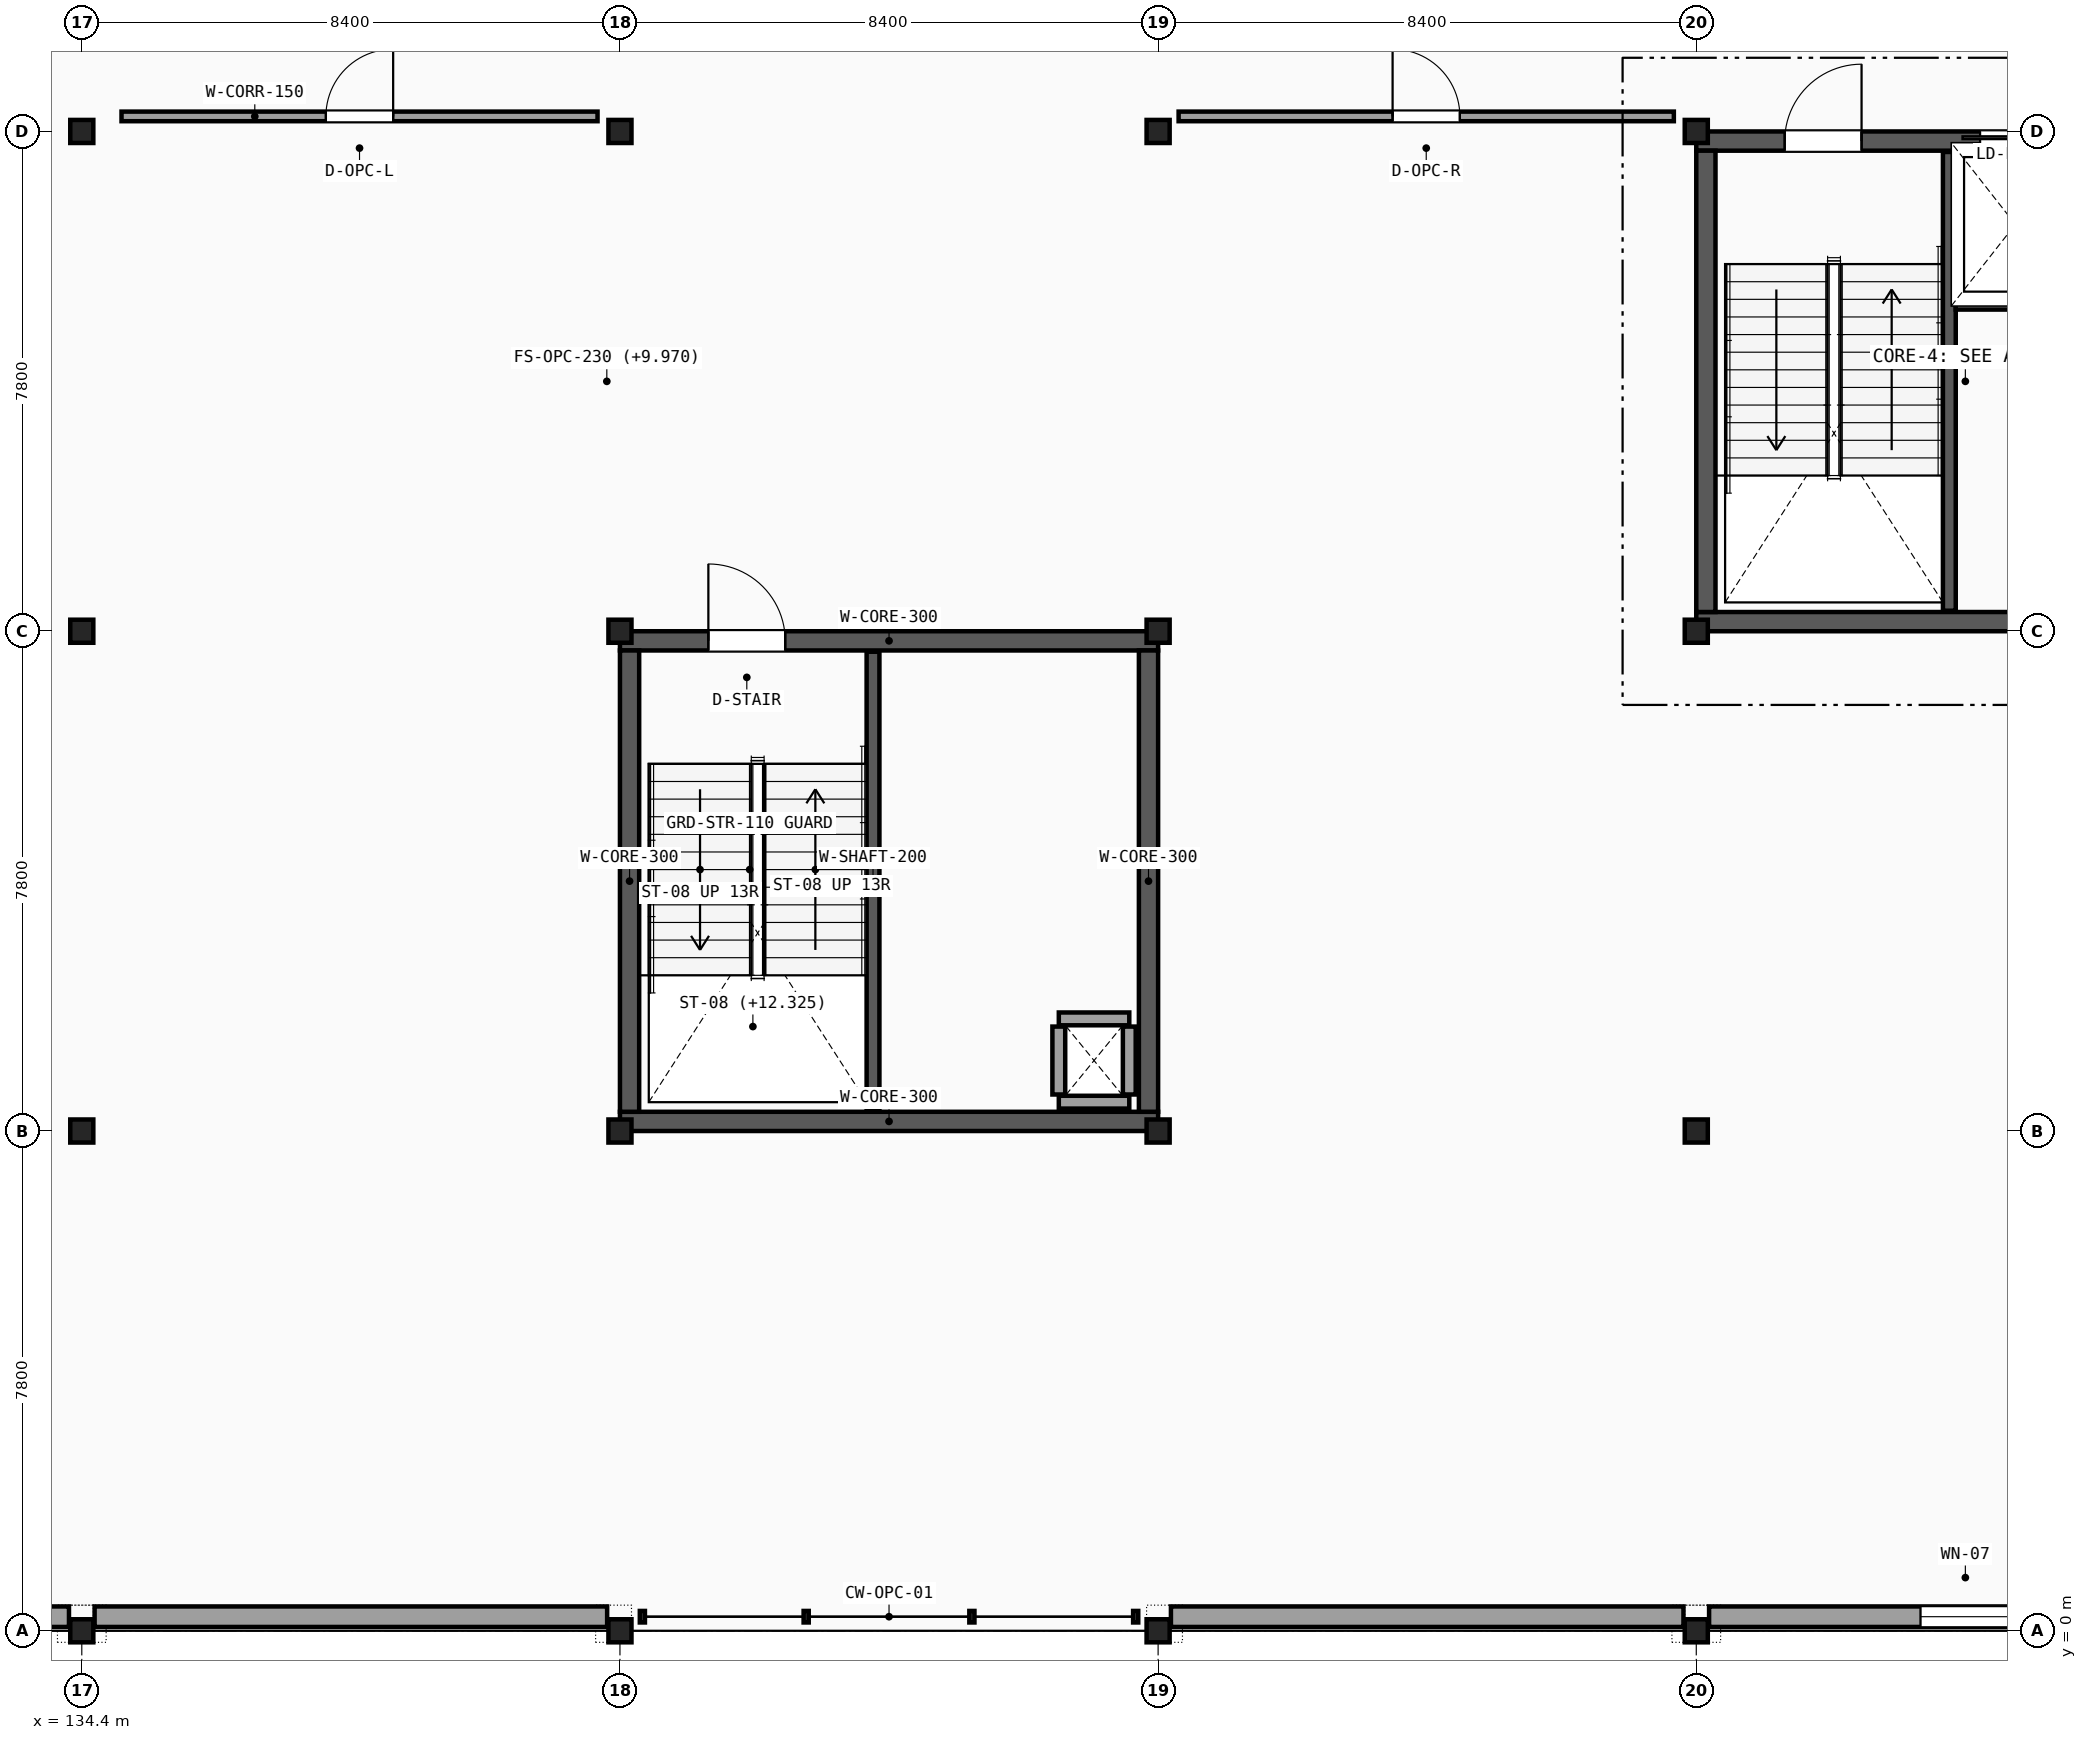
"""IFC4 building model, lengths in metres.
Left out: names, types, materials, properties, quantities, classifications, styles, units other than length and angle.
Written with IfcOpenShell. Run it as: python <this file> out.ifc"""

import sys

from ifc_helpers import new_model, si_unit, direction, frame, frame_2d, origin, origin_2d, place, context, subcontext, project, spatial, rectangle, i_section, extrude, element, fill, save


model = new_model("IFC4")
c1 = context("Model", 3, precision=1e-05, world=origin(), true_north=direction((0.0, 1.0)))
c2 = subcontext(c1, "Body", "Model", "MODEL_VIEW")
j1 = project(units=[si_unit("LENGTHUNIT", "METRE"), si_unit("PLANEANGLEUNIT", "RADIAN")], contexts=[c1])
p1 = place(None, origin())
s1 = spatial("IfcSite", under=j1, at=p1, CompositionType="ELEMENT")
p2 = place(p1, origin())
s2 = spatial("IfcBuilding", under=s1, at=p2, CompositionType="ELEMENT")
p3 = place(p2, frame((0.0, 0.0, 10.2)))
s3 = spatial("IfcBuildingStorey", under=s2, at=p3, CompositionType="ELEMENT", Elevation=10.2)
for number, where, z_axis, x_axis in (
    (1, (134.4, 0.0, 0.0), (0.0, 0.0, 1.0), (1.0, 0.0, 0.0)),
    (2, (134.4, 7.8, 0.0), (0.0, 0.0, 1.0), (1.0, 0.0, 0.0)),
    (3, (134.4, 15.6, 0.0), (0.0, 0.0, 1.0), (1.0, 0.0, 0.0)),
    (4, (134.4, 23.4, 0.0), (0.0, 0.0, 1.0), (1.0, 0.0, 0.0)),
    (5, (142.8, 0.0, 0.0), (0.0, 0.0, 1.0), (1.0, 0.0, 0.0)),
    (6, (142.8, 7.8, 0.0), (0.0, 0.0, 1.0), (1.0, 0.0, 0.0)),
    (7, (142.8, 15.6, 0.0), (0.0, 0.0, 1.0), (1.0, 0.0, 0.0)),
    (8, (142.8, 23.4, 0.0), (0.0, 0.0, 1.0), (1.0, 0.0, 0.0)),
    (9, (151.2, 0.0, 0.0), (0.0, 0.0, 1.0), (1.0, 0.0, 0.0)),
    (10, (151.2, 7.8, 0.0), (0.0, 0.0, 1.0), (1.0, 0.0, 0.0)),
    (11, (151.2, 15.6, 0.0), (0.0, 0.0, 1.0), (1.0, 0.0, 0.0)),
    (12, (151.2, 23.4, 0.0), (0.0, 0.0, 1.0), (1.0, 0.0, 0.0)),
    (13, (159.6, 0.0, 0.0), (0.0, 0.0, 1.0), (1.0, 0.0, 0.0)),
    (14, (159.6, 7.8, 0.0), (0.0, 0.0, 1.0), (1.0, 0.0, 0.0)),
    (15, (159.6, 15.6, 0.0), (0.0, 0.0, 1.0), (1.0, 0.0, 0.0)),
    (16, (159.6, 23.4, 0.0), (0.0, 0.0, 1.0), (1.0, 0.0, 0.0)),
):
    element("IfcColumn", number, at=place(p3, frame(where, z_axis=z_axis, x_axis=x_axis)), inside=s3, PredefinedType="COLUMN", context=c2, shape_type="SweptSolid", body=[
        extrude(i_section(OverallWidth=0.3, OverallDepth=0.36, WebThickness=0.012, FlangeThickness=0.022, FilletRadius=0.027, at=origin_2d()), origin(), (0.0, 0.0, 1.0), 4.65),
    ])
p4 = place(p3, frame((126.2, 0.22, 0.0), z_axis=(0.0, 0.0, 1.0), x_axis=(1.0, 0.0, 0.0)))
e17 = element("IfcWall", 17, at=p4, inside=s3, PredefinedType="SOLIDWALL", context=c2, shape_type="SweptSolid", body=[
    extrude(rectangle(XDim=8.0, YDim=0.32, at=frame_2d((4.0, 0.0))), origin(), (0.0, 0.0, 1.0), 4.0),
])
p5 = place(p4, frame((3.1, 0.0, 1.4)))
e18 = element("IfcOpeningElement", 18, at=p5, cuts=e17, PredefinedType="OPENING", context=c2, shape_type="SweptSolid", body=[
    extrude(rectangle(XDim=1.8, YDim=1.1, at=frame_2d((0.9, 0.55))), frame((0.0, 0.17, 0.0), z_axis=(0.0, -1.0, 0.0), x_axis=(1.0, 0.0, 0.0)), (0.0, 0.0, 1.0), 0.34),
])
for number, where, z_axis, x_axis in (
    (19, (134.6, 0.22, 0.0), (0.0, 0.0, 1.0), (1.0, 0.0, 0.0)),
    (20, (151.4, 0.22, 0.0), (0.0, 0.0, 1.0), (1.0, 0.0, 0.0)),
):
    element("IfcWall", number, at=place(p3, frame(where, z_axis=z_axis, x_axis=x_axis)), inside=s3, PredefinedType="SOLIDWALL", context=c2, shape_type="SweptSolid", body=[
        extrude(rectangle(XDim=8.0, YDim=0.32, at=frame_2d((4.0, 0.0))), origin(), (0.0, 0.0, 1.0), 4.0),
    ])
p6 = place(p3, frame((159.8, 0.22, 0.0), z_axis=(0.0, 0.0, 1.0), x_axis=(1.0, 0.0, 0.0)))
e21 = element("IfcWall", 21, at=p6, inside=s3, PredefinedType="SOLIDWALL", context=c2, shape_type="SweptSolid", body=[
    extrude(rectangle(XDim=8.0, YDim=0.32, at=frame_2d((4.0, 0.0))), origin(), (0.0, 0.0, 1.0), 4.0),
])
p7 = place(p6, frame((3.3, 0.0, 0.95)))
e22 = element("IfcOpeningElement", 22, at=p7, cuts=e21, PredefinedType="OPENING", context=c2, shape_type="SweptSolid", body=[
    extrude(rectangle(XDim=1.4, YDim=1.55, at=frame_2d((0.7, 0.775))), frame((0.0, 0.17, 0.0), z_axis=(0.0, -1.0, 0.0), x_axis=(1.0, 0.0, 0.0)), (0.0, 0.0, 1.0), 0.34),
])
p8 = place(p3, frame((159.6, 15.75, 0.0), z_axis=(0.0, 0.0, 1.0), x_axis=(1.0, 0.0, 0.0)))
e23 = element("IfcWall", 23, at=p8, inside=s3, PredefinedType="SHEAR", context=c2, shape_type="SweptSolid", body=[
    extrude(rectangle(XDim=8.4, YDim=0.3, at=frame_2d((4.2, 0.0))), origin(), (0.0, 0.0, 1.0), 4.42),
])
p9 = place(p3, frame((159.6, 23.25, 0.0), z_axis=(0.0, 0.0, 1.0), x_axis=(1.0, 0.0, 0.0)))
e24 = element("IfcWall", 24, at=p9, inside=s3, PredefinedType="SHEAR", context=c2, shape_type="SweptSolid", body=[
    extrude(rectangle(XDim=8.4, YDim=0.3, at=frame_2d((4.2, 0.0))), origin(), (0.0, 0.0, 1.0), 4.42),
])
p10 = place(p9, frame((1.38, 0.0, 0.0)))
e25 = element("IfcOpeningElement", 25, at=p10, cuts=e24, PredefinedType="OPENING", context=c2, shape_type="SweptSolid", body=[
    extrude(rectangle(XDim=1.2, YDim=2.15, at=frame_2d((0.6, 1.075))), frame((0.0, 0.16, 0.0), z_axis=(0.0, -1.0, 0.0), x_axis=(1.0, 0.0, 0.0)), (0.0, 0.0, 1.0), 0.32),
])
p11 = place(p9, frame((4.43, 0.0, 0.0)))
e26 = element("IfcOpeningElement", 26, at=p11, cuts=e24, PredefinedType="OPENING", context=c2, shape_type="SweptSolid", body=[
    extrude(rectangle(XDim=1.1, YDim=2.15, at=frame_2d((0.55, 1.075))), frame((0.0, 0.16, 0.0), z_axis=(0.0, -1.0, 0.0), x_axis=(1.0, 0.0, 0.0)), (0.0, 0.0, 1.0), 0.32),
])
p12 = place(p9, frame((6.45, 0.0, 0.0)))
e27 = element("IfcOpeningElement", 27, at=p12, cuts=e24, PredefinedType="OPENING", context=c2, shape_type="SweptSolid", body=[
    extrude(rectangle(XDim=1.1, YDim=2.15, at=frame_2d((0.55, 1.075))), frame((0.0, 0.16, 0.0), z_axis=(0.0, -1.0, 0.0), x_axis=(1.0, 0.0, 0.0)), (0.0, 0.0, 1.0), 0.32),
])
p13 = place(p3, frame((159.75, 15.9, 0.0), z_axis=(0.0, 0.0, 1.0), x_axis=(0.0, 1.0, 0.0)))
e28 = element("IfcWall", 28, at=p13, inside=s3, PredefinedType="SHEAR", context=c2, shape_type="SweptSolid", body=[
    extrude(rectangle(XDim=7.2, YDim=0.3, at=frame_2d((3.6, 0.0))), origin(), (0.0, 0.0, 1.0), 4.42),
])
p14 = place(p3, frame((163.55, 15.92, 0.0), z_axis=(0.0, 0.0, 1.0), x_axis=(0.0, 1.0, 0.0)))
e29 = element("IfcWall", 29, at=p14, inside=s3, PredefinedType="SHEAR", context=c2, shape_type="SweptSolid", body=[
    extrude(rectangle(XDim=7.16, YDim=0.2, at=frame_2d((3.58, 0.0))), origin(), (0.0, 0.0, 1.0), 4.42),
])
p15 = place(p3, frame((163.65, 20.72, 0.0), z_axis=(0.0, 0.0, 1.0), x_axis=(1.0, 0.0, 0.0)))
e30 = element("IfcWall", 30, at=p15, inside=s3, PredefinedType="PARTITIONING", context=c2, shape_type="SweptSolid", body=[
    extrude(rectangle(XDim=1.86, YDim=0.2, at=frame_2d((0.93, 0.0))), origin(), (0.0, 0.0, 1.0), 3.9),
])
p16 = place(p3, frame((142.8, 7.95, 0.0), z_axis=(0.0, 0.0, 1.0), x_axis=(1.0, 0.0, 0.0)))
e31 = element("IfcWall", 31, at=p16, inside=s3, PredefinedType="SHEAR", context=c2, shape_type="SweptSolid", body=[
    extrude(rectangle(XDim=8.4, YDim=0.3, at=frame_2d((4.2, 0.0))), origin(), (0.0, 0.0, 1.0), 4.42),
])
p17 = place(p3, frame((142.8, 15.45, 0.0), z_axis=(0.0, 0.0, 1.0), x_axis=(1.0, 0.0, 0.0)))
e32 = element("IfcWall", 32, at=p17, inside=s3, PredefinedType="SHEAR", context=c2, shape_type="SweptSolid", body=[
    extrude(rectangle(XDim=8.4, YDim=0.3, at=frame_2d((4.2, 0.0))), origin(), (0.0, 0.0, 1.0), 4.42),
])
p18 = place(p17, frame((1.38, 0.0, 0.0)))
e33 = element("IfcOpeningElement", 33, at=p18, cuts=e32, PredefinedType="OPENING", context=c2, shape_type="SweptSolid", body=[
    extrude(rectangle(XDim=1.2, YDim=2.15, at=frame_2d((0.6, 1.075))), frame((0.0, 0.16, 0.0), z_axis=(0.0, -1.0, 0.0), x_axis=(1.0, 0.0, 0.0)), (0.0, 0.0, 1.0), 0.32),
])
for number, where, z_axis, x_axis in (
    (34, (142.95, 8.1, 0.0), (0.0, 0.0, 1.0), (0.0, 1.0, 0.0)),
    (35, (151.05, 8.1, 0.0), (0.0, 0.0, 1.0), (0.0, 1.0, 0.0)),
):
    element("IfcWall", number, at=place(p3, frame(where, z_axis=z_axis, x_axis=x_axis)), inside=s3, PredefinedType="SHEAR", context=c2, shape_type="SweptSolid", body=[
        extrude(rectangle(XDim=7.2, YDim=0.3, at=frame_2d((3.6, 0.0))), origin(), (0.0, 0.0, 1.0), 4.42),
    ])
p19 = place(p3, frame((146.75, 8.12, 0.0), z_axis=(0.0, 0.0, 1.0), x_axis=(0.0, 1.0, 0.0)))
e36 = element("IfcWall", 36, at=p19, inside=s3, PredefinedType="SHEAR", context=c2, shape_type="SweptSolid", body=[
    extrude(rectangle(XDim=7.16, YDim=0.2, at=frame_2d((3.58, 0.0))), origin(), (0.0, 0.0, 1.0), 4.42),
])
for number, where, z_axis, x_axis in (
    (37, (149.65, 8.25, 0.0), (0.0, 0.0, 1.0), (1.0, 0.0, 0.0)),
    (38, (149.65, 9.55, 0.0), (0.0, 0.0, 1.0), (1.0, 0.0, 0.0)),
):
    element("IfcWall", number, at=place(p3, frame(where, z_axis=z_axis, x_axis=x_axis)), inside=s3, PredefinedType="PARTITIONING", context=c2, shape_type="SweptSolid", body=[
        extrude(rectangle(XDim=1.1, YDim=0.2, at=frame_2d((0.55, 0.0))), origin(), (0.0, 0.0, 1.0), 3.8),
    ])
for number, where, z_axis, x_axis in (
    (39, (149.65, 8.37, 0.0), (0.0, 0.0, 1.0), (0.0, 1.0, 0.0)),
    (40, (150.75, 8.37, 0.0), (0.0, 0.0, 1.0), (0.0, 1.0, 0.0)),
):
    element("IfcWall", number, at=place(p3, frame(where, z_axis=z_axis, x_axis=x_axis)), inside=s3, PredefinedType="PARTITIONING", context=c2, shape_type="SweptSolid", body=[
        extrude(rectangle(XDim=1.06, YDim=0.2, at=frame_2d((0.53, 0.0))), origin(), (0.0, 0.0, 1.0), 3.8),
    ])
p20 = place(p3, frame((135.02, 23.635, 0.0), z_axis=(0.0, 0.0, 1.0), x_axis=(1.0, 0.0, 0.0)))
e41 = element("IfcWall", 41, at=p20, inside=s3, PredefinedType="PARTITIONING", context=c2, shape_type="SweptSolid", body=[
    extrude(rectangle(XDim=7.43, YDim=0.15, at=frame_2d((3.715, 0.0))), origin(), (0.0, 0.0, 1.0), 3.9),
])
p21 = place(p20, frame((3.19, 0.0, 0.0)))
e42 = element("IfcOpeningElement", 42, at=p21, cuts=e41, PredefinedType="OPENING", context=c2, shape_type="SweptSolid", body=[
    extrude(rectangle(XDim=1.05, YDim=2.15, at=frame_2d((0.525, 1.075))), frame((0.0, 0.085, 0.0), z_axis=(0.0, -1.0, 0.0), x_axis=(1.0, 0.0, 0.0)), (0.0, 0.0, 1.0), 0.17),
])
p22 = place(p3, frame((151.52, 23.635, 0.0), z_axis=(0.0, 0.0, 1.0), x_axis=(1.0, 0.0, 0.0)))
e43 = element("IfcWall", 43, at=p22, inside=s3, PredefinedType="PARTITIONING", context=c2, shape_type="SweptSolid", body=[
    extrude(rectangle(XDim=7.73, YDim=0.15, at=frame_2d((3.865, 0.0))), origin(), (0.0, 0.0, 1.0), 3.9),
])
p23 = place(p22, frame((3.34, 0.0, 0.0)))
e44 = element("IfcOpeningElement", 44, at=p23, cuts=e43, PredefinedType="OPENING", context=c2, shape_type="SweptSolid", body=[
    extrude(rectangle(XDim=1.05, YDim=2.15, at=frame_2d((0.525, 1.075))), frame((0.0, 0.085, 0.0), z_axis=(0.0, -1.0, 0.0), x_axis=(1.0, 0.0, 0.0)), (0.0, 0.0, 1.0), 0.17),
])
p24 = place(p7, origin())
e45 = element("IfcWindow", 45, at=p24, inside=s3, PartitioningType="SINGLE_PANEL", PredefinedType="WINDOW", context=c2, shape_type="SweptSolid", body=[
    extrude(rectangle(XDim=1.4, YDim=1.55, at=frame_2d((0.7, 0.775))), frame((0.0, 0.03, 0.0), z_axis=(0.0, -1.0, 0.0), x_axis=(1.0, 0.0, 0.0)), (0.0, 0.0, 1.0), 0.06),
])
fill(e22, e45)
p25 = place(p10, origin())
e46 = element("IfcDoor", 46, at=p25, inside=s3, OperationType="SINGLE_SWING_RIGHT", PredefinedType="DOOR", context=c2, shape_type="SweptSolid", body=[
    extrude(rectangle(XDim=1.2, YDim=2.15, at=frame_2d((0.6, 1.075))), frame((0.0, 0.025, 0.0), z_axis=(0.0, -1.0, 0.0), x_axis=(1.0, 0.0, 0.0)), (0.0, 0.0, 1.0), 0.05),
])
fill(e25, e46)
p26 = place(p11, origin())
e47 = element("IfcDoor", 47, at=p26, inside=s3, OperationType="DOUBLE_DOOR_SLIDING", PredefinedType="DOOR", context=c2, shape_type="SweptSolid", body=[
    extrude(rectangle(XDim=1.1, YDim=2.15, at=frame_2d((0.55, 1.075))), frame((0.0, 0.025, 0.0), z_axis=(0.0, -1.0, 0.0), x_axis=(1.0, 0.0, 0.0)), (0.0, 0.0, 1.0), 0.05),
])
fill(e26, e47)
p27 = place(p18, origin())
e48 = element("IfcDoor", 48, at=p27, inside=s3, OperationType="SINGLE_SWING_LEFT", PredefinedType="DOOR", context=c2, shape_type="SweptSolid", body=[
    extrude(rectangle(XDim=1.2, YDim=2.15, at=frame_2d((0.6, 1.075))), frame((0.0, 0.025, 0.0), z_axis=(0.0, -1.0, 0.0), x_axis=(1.0, 0.0, 0.0)), (0.0, 0.0, 1.0), 0.05),
])
fill(e33, e48)
p28 = place(p21, origin())
e49 = element("IfcDoor", 49, at=p28, inside=s3, OperationType="SINGLE_SWING_RIGHT", PredefinedType="DOOR", context=c2, shape_type="SweptSolid", body=[
    extrude(rectangle(XDim=1.05, YDim=2.15, at=frame_2d((0.525, 1.075))), frame((0.0, 0.025, 0.0), z_axis=(0.0, -1.0, 0.0), x_axis=(1.0, 0.0, 0.0)), (0.0, 0.0, 1.0), 0.05),
])
fill(e42, e49)
p29 = place(p23, origin())
e50 = element("IfcDoor", 50, at=p29, inside=s3, OperationType="SINGLE_SWING_LEFT", PredefinedType="DOOR", context=c2, shape_type="SweptSolid", body=[
    extrude(rectangle(XDim=1.05, YDim=2.15, at=frame_2d((0.525, 1.075))), frame((0.0, 0.025, 0.0), z_axis=(0.0, -1.0, 0.0), x_axis=(1.0, 0.0, 0.0)), (0.0, 0.0, 1.0), 0.05),
])
fill(e44, e50)
save(model, sys.argv[1])
